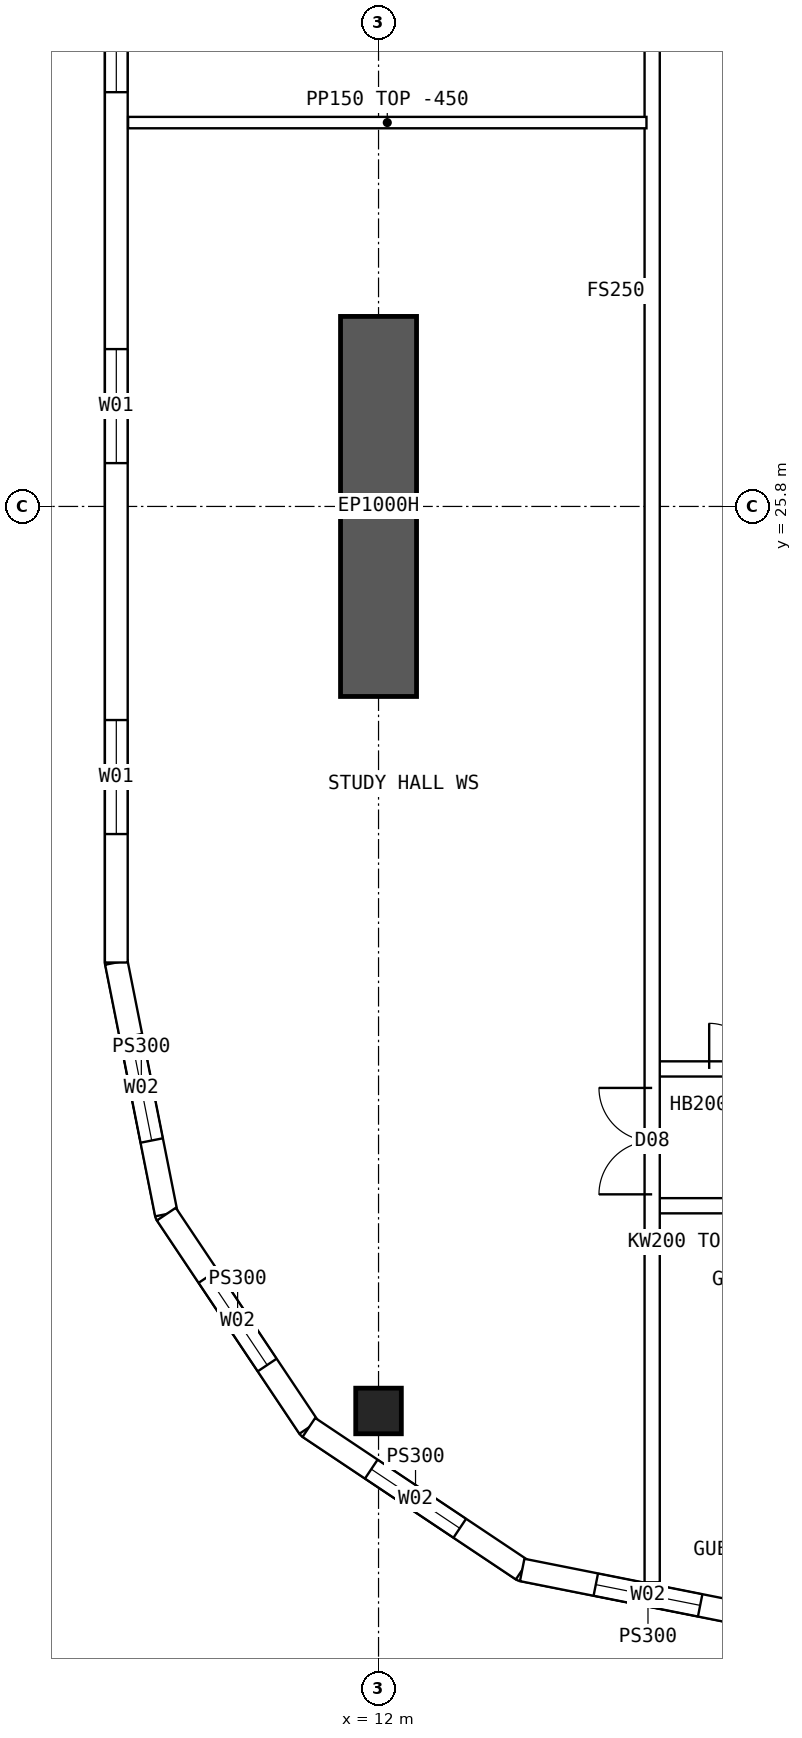
"""IFC4 building model, lengths in metres.
Left out: names, types, materials, properties, quantities, classifications, styles, units other than length and angle.
Written with IfcOpenShell. Run it as: python <this file> out.ifc"""

import sys

from ifc_helpers import new_model, si_unit, direction, frame, frame_2d, origin, origin_2d, place, context, subcontext, project, spatial, polyline, rectangle, hollow_rectangle, outline, extrude, element, fill, save


model = new_model("IFC4")
c1 = context("Model", 3, precision=1e-05, world=origin(), true_north=direction((0.0, 1.0)))
c2 = subcontext(c1, "Body", "Model", "MODEL_VIEW")
j1 = project(units=[si_unit("LENGTHUNIT", "METRE"), si_unit("PLANEANGLEUNIT", "RADIAN")], contexts=[c1])
p1 = place(None, origin())
s1 = spatial("IfcSite", under=j1, at=p1, CompositionType="ELEMENT")
p2 = place(p1, origin())
s2 = spatial("IfcBuilding", under=s1, at=p2, CompositionType="ELEMENT")
p3 = place(p2, frame((0.0, 0.0, 242.8)))
s3 = spatial("IfcBuildingStorey", under=s2, at=p3, CompositionType="ELEMENT", Elevation=242.8)
p4 = place(p3, frame((12.0, 13.9, 0.0), z_axis=(0.0, 0.0, 1.0), x_axis=(1.0, 0.0, 0.0)))
e1 = element("IfcColumn", 1, at=p4, inside=s3, PredefinedType="COLUMN", context=c2, shape_type="SweptSolid", body=[
    extrude(hollow_rectangle(XDim=0.6, YDim=0.6, WallThickness=0.06, at=origin_2d()), origin(), (0.0, 0.0, 1.0), 3.75),
])
p5 = place(p3, frame((12.0, 23.3, 0.0), z_axis=(0.0, 0.0, 1.0), x_axis=(0.0, 1.0, 0.0)))
e2 = element("IfcWall", 2, at=p5, inside=s3, PredefinedType="SHEAR", context=c2, shape_type="SweptSolid", body=[
    extrude(rectangle(XDim=5.0, YDim=1.0, at=frame_2d((2.5, 0.0))), origin(), (0.0, 0.0, 1.0), 3.75),
])
p6 = place(p3, frame((8.55, 44.2, 0.0), z_axis=(0.0, 0.0, 1.0), x_axis=(0.0, -1.0, 0.0)))
e3 = element("IfcWall", 3, at=p6, inside=s3, PredefinedType="SOLIDWALL", context=c2, shape_type="SweptSolid", body=[
    extrude(outline(polyline([(-0.015, -0.15), (24.415, -0.15), (24.385, 0.15), (0.015, 0.15), (-0.015, -0.15)])), origin(), (0.0, 0.0, 1.0), 3.3),
])
p7 = place(p6, frame((1.69, 0.0, 0.9)))
e4 = element("IfcOpeningElement", 4, at=p7, cuts=e3, PredefinedType="OPENING", context=c2, shape_type="SweptSolid", body=[
    extrude(rectangle(XDim=1.5, YDim=2.0, at=frame_2d((0.75, 1.0))), frame((0.0, 0.16, 0.0), z_axis=(0.0, -1.0, 0.0), x_axis=(1.0, 0.0, 0.0)), (0.0, 0.0, 1.0), 0.32),
])
p8 = place(p6, frame((6.57, 0.0, 0.9)))
e5 = element("IfcOpeningElement", 5, at=p8, cuts=e3, PredefinedType="OPENING", context=c2, shape_type="SweptSolid", body=[
    extrude(rectangle(XDim=1.5, YDim=2.0, at=frame_2d((0.75, 1.0))), frame((0.0, 0.16, 0.0), z_axis=(0.0, -1.0, 0.0), x_axis=(1.0, 0.0, 0.0)), (0.0, 0.0, 1.0), 0.32),
])
p9 = place(p6, frame((11.45, 0.0, 0.9)))
e6 = element("IfcOpeningElement", 6, at=p9, cuts=e3, PredefinedType="OPENING", context=c2, shape_type="SweptSolid", body=[
    extrude(rectangle(XDim=1.5, YDim=2.0, at=frame_2d((0.75, 1.0))), frame((0.0, 0.16, 0.0), z_axis=(0.0, -1.0, 0.0), x_axis=(1.0, 0.0, 0.0)), (0.0, 0.0, 1.0), 0.32),
])
p10 = place(p6, frame((16.33, 0.0, 0.9)))
e7 = element("IfcOpeningElement", 7, at=p10, cuts=e3, PredefinedType="OPENING", context=c2, shape_type="SweptSolid", body=[
    extrude(rectangle(XDim=1.5, YDim=2.0, at=frame_2d((0.75, 1.0))), frame((0.0, 0.16, 0.0), z_axis=(0.0, -1.0, 0.0), x_axis=(1.0, 0.0, 0.0)), (0.0, 0.0, 1.0), 0.32),
])
p11 = place(p6, frame((21.21, 0.0, 0.9)))
e8 = element("IfcOpeningElement", 8, at=p11, cuts=e3, PredefinedType="OPENING", context=c2, shape_type="SweptSolid", body=[
    extrude(rectangle(XDim=1.5, YDim=2.0, at=frame_2d((0.75, 1.0))), frame((0.0, 0.16, 0.0), z_axis=(0.0, -1.0, 0.0), x_axis=(1.0, 0.0, 0.0)), (0.0, 0.0, 1.0), 0.32),
])
p12 = place(p3, frame((8.55, 19.8, 0.0), z_axis=(0.0, 0.0, 1.0), x_axis=(0.19508664885, -0.980786011034, 0.0)))
e9 = element("IfcWall", 9, at=p12, inside=s3, PredefinedType="SOLIDWALL", context=c2, shape_type="SweptSolid", body=[
    extrude(outline(polyline([(-0.015, -0.15), (3.405, -0.15), (3.345, 0.15), (0.015, 0.15), (-0.015, -0.15)])), origin(), (0.0, 0.0, 1.0), 3.3),
])
p13 = place(p12, frame((0.988, 0.0, 0.9)))
e10 = element("IfcOpeningElement", 10, at=p13, cuts=e9, PredefinedType="OPENING", context=c2, shape_type="SweptSolid", body=[
    extrude(rectangle(XDim=1.4, YDim=1.8, at=frame_2d((0.7, 0.9))), frame((0.0, 0.16, 0.0), z_axis=(0.0, -1.0, 0.0), x_axis=(1.0, 0.0, 0.0)), (0.0, 0.0, 1.0), 0.32),
])
p14 = place(p3, frame((9.208, 16.49, 0.0), z_axis=(0.0, 0.0, 1.0), x_axis=(0.555567969291, -0.831471124873, 0.0)))
e11 = element("IfcWall", 11, at=p14, inside=s3, PredefinedType="SOLIDWALL", context=c2, shape_type="SweptSolid", body=[
    extrude(outline(polyline([(-0.03, -0.15), (3.405, -0.15), (3.345, 0.15), (0.03, 0.15), (-0.03, -0.15)])), origin(), (0.0, 0.0, 1.0), 3.3),
])
p15 = place(p14, frame((0.988, 0.0, 0.9)))
e12 = element("IfcOpeningElement", 12, at=p15, cuts=e11, PredefinedType="OPENING", context=c2, shape_type="SweptSolid", body=[
    extrude(rectangle(XDim=1.4, YDim=1.8, at=frame_2d((0.7, 0.9))), frame((0.0, 0.16, 0.0), z_axis=(0.0, -1.0, 0.0), x_axis=(1.0, 0.0, 0.0)), (0.0, 0.0, 1.0), 0.32),
])
p16 = place(p3, frame((11.083, 13.684, 0.0), z_axis=(0.0, 0.0, 1.0), x_axis=(0.831460037396, -0.555584562613, 0.0)))
e13 = element("IfcWall", 13, at=p16, inside=s3, PredefinedType="SOLIDWALL", context=c2, shape_type="SweptSolid", body=[
    extrude(outline(polyline([(-0.03, -0.15), (3.405, -0.15), (3.345, 0.15), (0.03, 0.15), (-0.03, -0.15)])), origin(), (0.0, 0.0, 1.0), 3.3),
])
p17 = place(p16, frame((0.988, 0.0, 0.9)))
e14 = element("IfcOpeningElement", 14, at=p17, cuts=e13, PredefinedType="OPENING", context=c2, shape_type="SweptSolid", body=[
    extrude(rectangle(XDim=1.4, YDim=1.8, at=frame_2d((0.7, 0.9))), frame((0.0, 0.16, 0.0), z_axis=(0.0, -1.0, 0.0), x_axis=(1.0, 0.0, 0.0)), (0.0, 0.0, 1.0), 0.32),
])
p18 = place(p3, frame((13.89, 11.808, 0.0), z_axis=(0.0, 0.0, 1.0), x_axis=(0.98078325777, -0.195100490205, 0.0)))
e15 = element("IfcWall", 15, at=p18, inside=s3, PredefinedType="SOLIDWALL", context=c2, shape_type="SweptSolid", body=[
    extrude(outline(polyline([(-0.03, -0.15), (3.405, -0.15), (3.345, 0.15), (0.03, 0.15), (-0.03, -0.15)])), origin(), (0.0, 0.0, 1.0), 3.3),
])
p19 = place(p18, frame((0.988, 0.0, 0.9)))
e16 = element("IfcOpeningElement", 16, at=p19, cuts=e15, PredefinedType="OPENING", context=c2, shape_type="SweptSolid", body=[
    extrude(rectangle(XDim=1.4, YDim=1.8, at=frame_2d((0.7, 0.9))), frame((0.0, 0.16, 0.0), z_axis=(0.0, -1.0, 0.0), x_axis=(1.0, 0.0, 0.0)), (0.0, 0.0, 1.0), 0.32),
])
p20 = place(p3, frame((15.6, 16.6, 0.0), z_axis=(0.0, 0.0, 1.0), x_axis=(1.0, 0.0, 0.0)))
e17 = element("IfcWall", 17, at=p20, inside=s3, PredefinedType="SOLIDWALL", context=c2, shape_type="SweptSolid", body=[
    extrude(rectangle(XDim=2.05, YDim=0.2, at=frame_2d((1.025, 0.0))), origin(), (0.0, 0.0, 1.0), 3.3),
])
p21 = place(p20, frame((0.95, 0.0, 0.0)))
e18 = element("IfcOpeningElement", 18, at=p21, cuts=e17, PredefinedType="OPENING", context=c2, shape_type="SweptSolid", body=[
    extrude(rectangle(XDim=0.9, YDim=2.1, at=frame_2d((0.45, 1.05))), frame((0.0, 0.11, 0.0), z_axis=(0.0, -1.0, 0.0), x_axis=(1.0, 0.0, 0.0)), (0.0, 0.0, 1.0), 0.22),
])
p22 = place(p3, frame((15.6, 18.4, 0.0), z_axis=(0.0, 0.0, 1.0), x_axis=(1.0, 0.0, 0.0)))
e19 = element("IfcWall", 19, at=p22, inside=s3, PredefinedType="SOLIDWALL", context=c2, shape_type="SweptSolid", body=[
    extrude(rectangle(XDim=2.05, YDim=0.2, at=frame_2d((1.025, 0.0))), origin(), (0.0, 0.0, 1.0), 3.3),
])
p23 = place(p22, frame((0.75, 0.0, 0.0)))
e20 = element("IfcOpeningElement", 20, at=p23, cuts=e19, PredefinedType="OPENING", context=c2, shape_type="SweptSolid", body=[
    extrude(rectangle(XDim=1.2, YDim=2.1, at=frame_2d((0.6, 1.05))), frame((0.0, 0.11, 0.0), z_axis=(0.0, -1.0, 0.0), x_axis=(1.0, 0.0, 0.0)), (0.0, 0.0, 1.0), 0.22),
])
p24 = place(p3, frame((8.705, 30.85, 0.0), z_axis=(0.0, 0.0, 1.0), x_axis=(1.0, 0.0, 0.0)))
e21 = element("IfcWall", 21, at=p24, inside=s3, PredefinedType="PARTITIONING", context=c2, shape_type="SweptSolid", body=[
    extrude(outline(polyline([(0.0, 0.0), (6.82, 0.0), (6.82, 3.3), (3.597, 3.3), (3.595, 2.85), (2.997, 2.85), (2.995, 3.3), (0.0, 3.3), (0.0, 0.0)])), frame((0.0, 0.075, 0.0), z_axis=(0.0, -1.0, 0.0), x_axis=(1.0, 0.0, 0.0)), (0.0, 0.0, 1.0), 0.15),
])
p25 = place(p3, frame((15.6, 11.646, 0.0), z_axis=(0.0, 0.0, 1.0), x_axis=(0.0, 1.0, 0.0)))
e22 = element("IfcWall", 22, at=p25, inside=s3, PredefinedType="SOLIDWALL", context=c2, shape_type="SweptSolid", body=[
    extrude(rectangle(XDim=40.708, YDim=0.2, at=frame_2d((20.354, 0.0))), origin(), (0.0, 0.0, 1.0), 3.3),
])
p26 = place(p25, frame((21.194, 0.0, 0.0)))
e23 = element("IfcOpeningElement", 23, at=p26, cuts=e22, PredefinedType="OPENING", context=c2, shape_type="SweptSolid", body=[
    extrude(rectangle(XDim=1.2, YDim=2.1, at=frame_2d((0.6, 1.05))), frame((0.0, 0.11, 0.0), z_axis=(0.0, -1.0, 0.0), x_axis=(1.0, 0.0, 0.0)), (0.0, 0.0, 1.0), 0.22),
])
p27 = place(p25, frame((5.104, 0.0, 0.0)))
e24 = element("IfcOpeningElement", 24, at=p27, cuts=e22, PredefinedType="OPENING", context=c2, shape_type="SweptSolid", body=[
    extrude(rectangle(XDim=1.4, YDim=2.1, at=frame_2d((0.7, 1.05))), frame((0.0, 0.11, 0.0), z_axis=(0.0, -1.0, 0.0), x_axis=(1.0, 0.0, 0.0)), (0.0, 0.0, 1.0), 0.22),
])
p28 = place(p25, frame((34.104, 0.0, 0.0)))
e25 = element("IfcOpeningElement", 25, at=p28, cuts=e22, PredefinedType="OPENING", context=c2, shape_type="SweptSolid", body=[
    extrude(rectangle(XDim=1.4, YDim=2.1, at=frame_2d((0.7, 1.05))), frame((0.0, 0.11, 0.0), z_axis=(0.0, -1.0, 0.0), x_axis=(1.0, 0.0, 0.0)), (0.0, 0.0, 1.0), 0.22),
])
p29 = place(p9, origin())
e26 = element("IfcWindow", 26, at=p29, inside=s3, PartitioningType="SINGLE_PANEL", PredefinedType="WINDOW", context=c2, shape_type="SweptSolid", body=[
    extrude(rectangle(XDim=1.5, YDim=2.0, at=frame_2d((0.75, 1.0))), frame((0.0, 0.03, 0.0), z_axis=(0.0, -1.0, 0.0), x_axis=(1.0, 0.0, 0.0)), (0.0, 0.0, 1.0), 0.06),
])
fill(e6, e26)
p30 = place(p10, origin())
e27 = element("IfcWindow", 27, at=p30, inside=s3, PartitioningType="SINGLE_PANEL", PredefinedType="WINDOW", context=c2, shape_type="SweptSolid", body=[
    extrude(rectangle(XDim=1.5, YDim=2.0, at=frame_2d((0.75, 1.0))), frame((0.0, 0.03, 0.0), z_axis=(0.0, -1.0, 0.0), x_axis=(1.0, 0.0, 0.0)), (0.0, 0.0, 1.0), 0.06),
])
fill(e7, e27)
p31 = place(p11, origin())
e28 = element("IfcWindow", 28, at=p31, inside=s3, PartitioningType="SINGLE_PANEL", PredefinedType="WINDOW", context=c2, shape_type="SweptSolid", body=[
    extrude(rectangle(XDim=1.5, YDim=2.0, at=frame_2d((0.75, 1.0))), frame((0.0, 0.03, 0.0), z_axis=(0.0, -1.0, 0.0), x_axis=(1.0, 0.0, 0.0)), (0.0, 0.0, 1.0), 0.06),
])
fill(e8, e28)
p32 = place(p13, origin())
e29 = element("IfcWindow", 29, at=p32, inside=s3, PartitioningType="SINGLE_PANEL", PredefinedType="WINDOW", context=c2, shape_type="SweptSolid", body=[
    extrude(rectangle(XDim=1.4, YDim=1.8, at=frame_2d((0.7, 0.9))), frame((0.0, 0.03, 0.0), z_axis=(0.0, -1.0, 0.0), x_axis=(1.0, 0.0, 0.0)), (0.0, 0.0, 1.0), 0.06),
])
fill(e10, e29)
p33 = place(p15, origin())
e30 = element("IfcWindow", 30, at=p33, inside=s3, PartitioningType="SINGLE_PANEL", PredefinedType="WINDOW", context=c2, shape_type="SweptSolid", body=[
    extrude(rectangle(XDim=1.4, YDim=1.8, at=frame_2d((0.7, 0.9))), frame((0.0, 0.03, 0.0), z_axis=(0.0, -1.0, 0.0), x_axis=(1.0, 0.0, 0.0)), (0.0, 0.0, 1.0), 0.06),
])
fill(e12, e30)
p34 = place(p17, origin())
e31 = element("IfcWindow", 31, at=p34, inside=s3, PartitioningType="SINGLE_PANEL", PredefinedType="WINDOW", context=c2, shape_type="SweptSolid", body=[
    extrude(rectangle(XDim=1.4, YDim=1.8, at=frame_2d((0.7, 0.9))), frame((0.0, 0.03, 0.0), z_axis=(0.0, -1.0, 0.0), x_axis=(1.0, 0.0, 0.0)), (0.0, 0.0, 1.0), 0.06),
])
fill(e14, e31)
p35 = place(p19, origin())
e32 = element("IfcWindow", 32, at=p35, inside=s3, PartitioningType="SINGLE_PANEL", PredefinedType="WINDOW", context=c2, shape_type="SweptSolid", body=[
    extrude(rectangle(XDim=1.4, YDim=1.8, at=frame_2d((0.7, 0.9))), frame((0.0, 0.03, 0.0), z_axis=(0.0, -1.0, 0.0), x_axis=(1.0, 0.0, 0.0)), (0.0, 0.0, 1.0), 0.06),
])
fill(e16, e32)
p36 = place(p23, origin())
e33 = element("IfcDoor", 33, at=p36, inside=s3, OperationType="DOUBLE_DOOR_SINGLE_SWING", PredefinedType="DOOR", context=c2, shape_type="SweptSolid", body=[
    extrude(rectangle(XDim=1.2, YDim=2.1, at=frame_2d((0.6, 1.05))), frame((0.0, 0.025, 0.0), z_axis=(0.0, -1.0, 0.0), x_axis=(1.0, 0.0, 0.0)), (0.0, 0.0, 1.0), 0.05),
])
fill(e20, e33)
p37 = place(p27, origin())
e34 = element("IfcDoor", 34, at=p37, inside=s3, OperationType="DOUBLE_DOOR_SINGLE_SWING", PredefinedType="DOOR", context=c2, shape_type="SweptSolid", body=[
    extrude(rectangle(XDim=1.4, YDim=2.1, at=frame_2d((0.7, 1.05))), frame((0.0, 0.025, 0.0), z_axis=(0.0, -1.0, 0.0), x_axis=(1.0, 0.0, 0.0)), (0.0, 0.0, 1.0), 0.05),
])
fill(e24, e34)
save(model, sys.argv[1])
